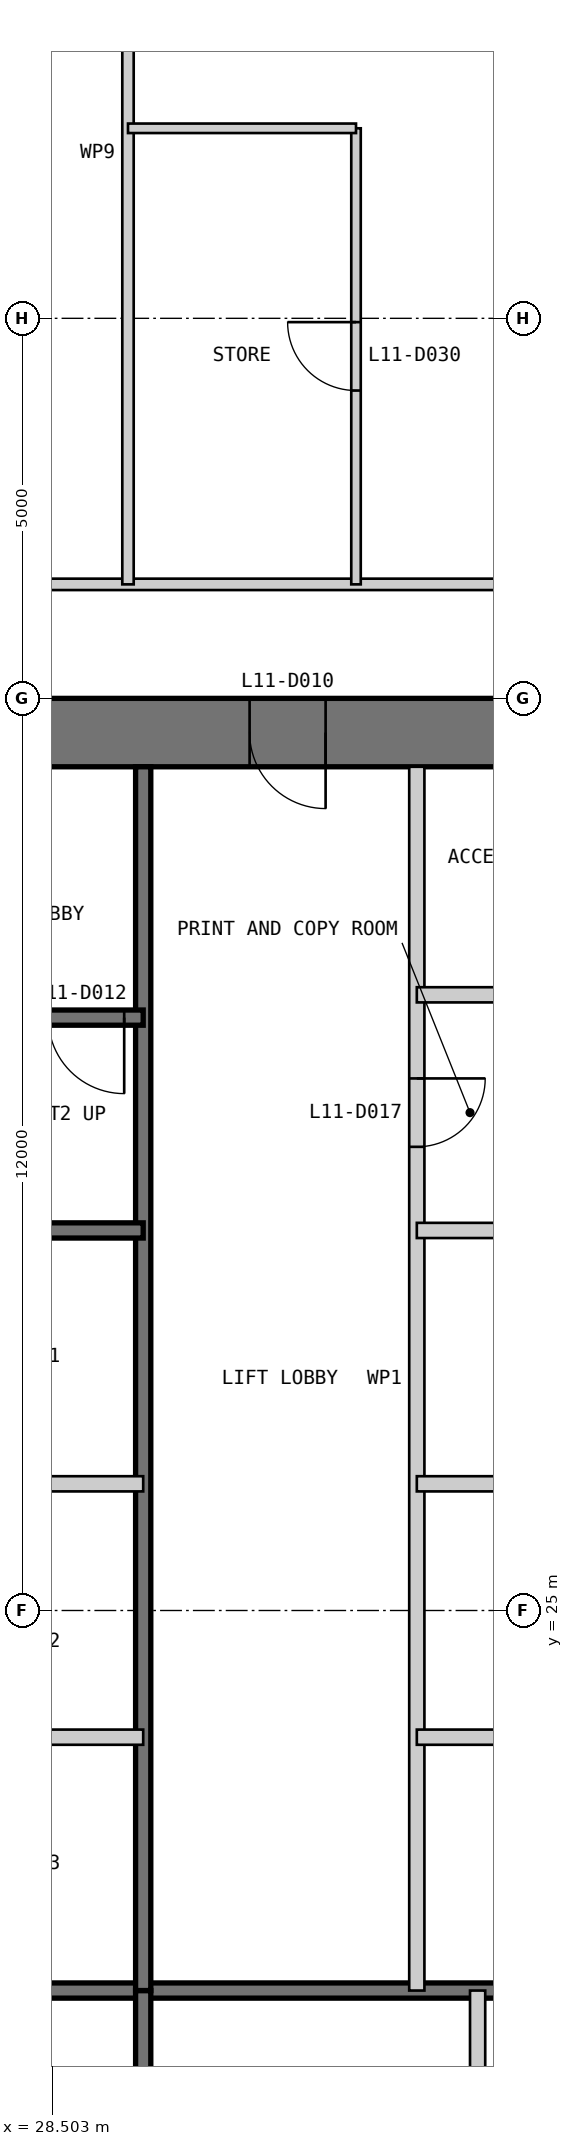
"""IFC4 building model, lengths in metres.
Left out: names, types, materials, properties, quantities, classifications, styles, units other than length and angle.
Written with IfcOpenShell. Run it as: python <this file> out.ifc"""

import sys

from ifc_helpers import new_model, si_unit, direction, frame, frame_2d, origin, place, context, subcontext, project, spatial, polyline, rectangle, outline, extrude, element, fill, save


model = new_model("IFC4")
c1 = context("Model", 3, precision=1e-05, world=origin(), true_north=direction((0.0, 1.0)))
c2 = subcontext(c1, "Body", "Model", "MODEL_VIEW")
j1 = project(units=[si_unit("LENGTHUNIT", "METRE"), si_unit("PLANEANGLEUNIT", "RADIAN")], contexts=[c1])
p1 = place(None, origin())
s1 = spatial("IfcSite", under=j1, at=p1, CompositionType="ELEMENT")
p2 = place(p1, origin())
s2 = spatial("IfcBuilding", under=s1, at=p2, CompositionType="ELEMENT")
p3 = place(p2, frame((0.0, 0.0, 51.0)))
s3 = spatial("IfcBuildingStorey", under=s2, at=p3, CompositionType="ELEMENT", Elevation=51.0)
p4 = place(p3, frame((37.0, 36.55, 0.0), z_axis=(0.0, 0.0, 1.0), x_axis=(-1.0, 0.0, 0.0)))
e1 = element("IfcWall", 1, at=p4, inside=s3, PredefinedType="SHEAR", context=c2, shape_type="SweptSolid", body=[
    extrude(outline(polyline([(0.0, -0.45), (24.0, -0.45), (23.1, 0.45), (0.9, 0.45), (0.0, -0.45)])), origin(), (0.0, 0.0, 1.0), 4.0),
])
p5 = place(p4, frame((4.9, 0.0, 0.0)))
e2 = element("IfcOpeningElement", 2, at=p5, cuts=e1, PredefinedType="OPENING", context=c2, shape_type="SweptSolid", body=[
    extrude(rectangle(XDim=1.0, YDim=2.2, at=frame_2d((0.5, 1.1))), frame((0.0, 0.46, 0.0), z_axis=(0.0, -1.0, 0.0), x_axis=(1.0, 0.0, 0.0)), (0.0, 0.0, 1.0), 0.92),
])
p6 = place(p4, frame((8.9, 0.0, 0.0)))
e3 = element("IfcOpeningElement", 3, at=p6, cuts=e1, PredefinedType="OPENING", context=c2, shape_type="SweptSolid", body=[
    extrude(rectangle(XDim=1.1, YDim=2.2, at=frame_2d((0.55, 1.1))), frame((0.0, 0.46, 0.0), z_axis=(0.0, -1.0, 0.0), x_axis=(1.0, 0.0, 0.0)), (0.0, 0.0, 1.0), 0.92),
])
p7 = place(p4, frame((15.05, 0.0, 0.0)))
e4 = element("IfcOpeningElement", 4, at=p7, cuts=e1, PredefinedType="OPENING", context=c2, shape_type="SweptSolid", body=[
    extrude(rectangle(XDim=0.9, YDim=2.2, at=frame_2d((0.45, 1.1))), frame((0.0, 0.46, 0.0), z_axis=(0.0, -1.0, 0.0), x_axis=(1.0, 0.0, 0.0)), (0.0, 0.0, 1.0), 0.92),
])
p8 = place(p4, frame((17.9, 0.0, 0.0)))
e5 = element("IfcOpeningElement", 5, at=p8, cuts=e1, PredefinedType="OPENING", context=c2, shape_type="SweptSolid", body=[
    extrude(rectangle(XDim=1.0, YDim=2.2, at=frame_2d((0.5, 1.1))), frame((0.0, 0.46, 0.0), z_axis=(0.0, -1.0, 0.0), x_axis=(1.0, 0.0, 0.0)), (0.0, 0.0, 1.0), 0.92),
])
p9 = place(p4, frame((21.4, 0.0, 0.0)))
e6 = element("IfcOpeningElement", 6, at=p9, cuts=e1, PredefinedType="OPENING", context=c2, shape_type="SweptSolid", body=[
    extrude(rectangle(XDim=1.0, YDim=2.2, at=frame_2d((0.5, 1.1))), frame((0.0, 0.46, 0.0), z_axis=(0.0, -1.0, 0.0), x_axis=(1.0, 0.0, 0.0)), (0.0, 0.0, 1.0), 0.92),
])
p10 = place(p3, frame((20.3, 20.0, 0.0), z_axis=(0.0, 0.0, 1.0), x_axis=(1.0, 0.0, 0.0)))
e7 = element("IfcWall", 7, at=p10, inside=s3, PredefinedType="SOLIDWALL", context=c2, shape_type="SweptSolid", body=[
    extrude(rectangle(XDim=15.8, YDim=0.2, at=frame_2d((7.9, 0.0))), origin(), (0.0, 0.0, 1.0), 3.8),
])
p11 = place(p3, frame((29.7, 13.9, 0.0), z_axis=(0.0, 0.0, 1.0), x_axis=(0.0, 1.0, 0.0)))
e8 = element("IfcWall", 8, at=p11, inside=s3, PredefinedType="SOLIDWALL", context=c2, shape_type="SweptSolid", body=[
    extrude(rectangle(XDim=6.1, YDim=0.2, at=frame_2d((3.05, 0.0))), origin(), (0.0, 0.0, 1.0), 3.8),
])
p12 = place(p3, frame((34.1, 13.9, 0.0), z_axis=(0.0, 0.0, 1.0), x_axis=(0.0, 1.0, 0.0)))
e9 = element("IfcWall", 9, at=p12, inside=s3, PredefinedType="PARTITIONING", context=c2, shape_type="SweptSolid", body=[
    extrude(rectangle(XDim=6.1, YDim=0.2, at=frame_2d((3.05, 0.0))), origin(), (0.0, 0.0, 1.0), 3.8),
])
p13 = place(p3, frame((33.3, 36.1, 0.0), z_axis=(0.0, 0.0, 1.0), x_axis=(0.0, -1.0, 0.0)))
e10 = element("IfcWall", 10, at=p13, inside=s3, PredefinedType="PARTITIONING", context=c2, shape_type="SweptSolid", body=[
    extrude(rectangle(XDim=16.1, YDim=0.2, at=frame_2d((8.05, 0.0))), origin(), (0.0, 0.0, 1.0), 3.8),
])
p14 = place(p13, frame((4.1, 0.0, 0.0)))
e11 = element("IfcOpeningElement", 11, at=p14, cuts=e10, PredefinedType="OPENING", context=c2, shape_type="SweptSolid", body=[
    extrude(rectangle(XDim=0.9, YDim=2.2, at=frame_2d((0.45, 1.1))), frame((0.0, 0.11, 0.0), z_axis=(0.0, -1.0, 0.0), x_axis=(1.0, 0.0, 0.0)), (0.0, 0.0, 1.0), 0.22),
])
p15 = place(p3, frame((29.7, 36.1, 0.0), z_axis=(0.0, 0.0, 1.0), x_axis=(0.0, -1.0, 0.0)))
e12 = element("IfcWall", 12, at=p15, inside=s3, PredefinedType="SOLIDWALL", context=c2, shape_type="SweptSolid", body=[
    extrude(rectangle(XDim=16.1, YDim=0.2, at=frame_2d((8.05, 0.0))), origin(), (0.0, 0.0, 1.0), 3.8),
])
for number, where, z_axis, x_axis in (
    (13, (36.1, 30.0, 0.0), (0.0, 0.0, 1.0), (-1.0, 0.0, 0.0)),
    (14, (36.1, 26.667, 0.0), (0.0, 0.0, 1.0), (-1.0, 0.0, 0.0)),
    (15, (36.1, 23.333, 0.0), (0.0, 0.0, 1.0), (-1.0, 0.0, 0.0)),
    (16, (29.7, 26.667, 0.0), (0.0, 0.0, 1.0), (-1.0, 0.0, 0.0)),
    (17, (29.7, 23.333, 0.0), (0.0, 0.0, 1.0), (-1.0, 0.0, 0.0)),
):
    element("IfcWall", number, at=place(p3, frame(where, z_axis=z_axis, x_axis=x_axis)), inside=s3, PredefinedType="PARTITIONING", context=c2, shape_type="SweptSolid", body=[
        extrude(rectangle(XDim=2.8, YDim=0.2, at=frame_2d((1.4, 0.0))), origin(), (0.0, 0.0, 1.0), 3.8),
    ])
p16 = place(p3, frame((29.7, 32.8, 0.0), z_axis=(0.0, 0.0, 1.0), x_axis=(-1.0, 0.0, 0.0)))
e18 = element("IfcWall", 18, at=p16, inside=s3, PredefinedType="SOLIDWALL", context=c2, shape_type="SweptSolid", body=[
    extrude(rectangle(XDim=9.4, YDim=0.2, at=frame_2d((4.7, 0.0))), origin(), (0.0, 0.0, 1.0), 3.8),
])
p17 = place(p16, frame((0.25, 0.0, 0.0)))
e19 = element("IfcOpeningElement", 19, at=p17, cuts=e18, PredefinedType="OPENING", context=c2, shape_type="SweptSolid", body=[
    extrude(rectangle(XDim=1.0, YDim=2.2, at=frame_2d((0.5, 1.1))), frame((0.0, 0.11, 0.0), z_axis=(0.0, -1.0, 0.0), x_axis=(1.0, 0.0, 0.0)), (0.0, 0.0, 1.0), 0.22),
])
p18 = place(p3, frame((29.7, 30.0, 0.0), z_axis=(0.0, 0.0, 1.0), x_axis=(-1.0, 0.0, 0.0)))
e20 = element("IfcWall", 20, at=p18, inside=s3, PredefinedType="SOLIDWALL", context=c2, shape_type="SweptSolid", body=[
    extrude(rectangle(XDim=15.8, YDim=0.2, at=frame_2d((7.9, 0.0))), origin(), (0.0, 0.0, 1.0), 3.8),
])
p19 = place(p3, frame((36.1, 33.1, 0.0), z_axis=(0.0, 0.0, 1.0), x_axis=(-1.0, 0.0, 0.0)))
e21 = element("IfcWall", 21, at=p19, inside=s3, PredefinedType="PARTITIONING", context=c2, shape_type="SweptSolid", body=[
    extrude(rectangle(XDim=2.8, YDim=0.2, at=frame_2d((1.4, 0.0))), origin(), (0.0, 0.0, 1.0), 3.8),
])
p20 = place(p3, frame((38.5, 38.5, 0.0), z_axis=(0.0, 0.0, 1.0), x_axis=(-1.0, 0.0, 0.0)))
e22 = element("IfcWall", 22, at=p20, inside=s3, PredefinedType="PARTITIONING", context=c2, shape_type="SweptSolid", body=[
    extrude(rectangle(XDim=27.0, YDim=0.15, at=frame_2d((13.5, 0.0))), origin(), (0.0, 0.0, 1.0), 3.85),
])
p21 = place(p20, frame((2.5, 0.0, 0.0)))
e23 = element("IfcOpeningElement", 23, at=p21, cuts=e22, PredefinedType="OPENING", context=c2, shape_type="SweptSolid", body=[
    extrude(rectangle(XDim=1.0, YDim=2.2, at=frame_2d((0.5, 1.1))), frame((0.0, 0.085, 0.0), z_axis=(0.0, -1.0, 0.0), x_axis=(1.0, 0.0, 0.0)), (0.0, 0.0, 1.0), 0.17),
])
p22 = place(p20, frame((16.0, 0.0, 0.0)))
e24 = element("IfcOpeningElement", 24, at=p22, cuts=e22, PredefinedType="OPENING", context=c2, shape_type="SweptSolid", body=[
    extrude(rectangle(XDim=1.0, YDim=2.2, at=frame_2d((0.5, 1.1))), frame((0.0, 0.085, 0.0), z_axis=(0.0, -1.0, 0.0), x_axis=(1.0, 0.0, 0.0)), (0.0, 0.0, 1.0), 0.17),
])
p23 = place(p3, frame((32.5, 44.5, 0.0), z_axis=(0.0, 0.0, 1.0), x_axis=(0.0, -1.0, 0.0)))
e25 = element("IfcWall", 25, at=p23, inside=s3, PredefinedType="PARTITIONING", context=c2, shape_type="SweptSolid", body=[
    extrude(rectangle(XDim=6.0, YDim=0.125, at=frame_2d((3.0, 0.0))), origin(), (0.0, 0.0, 1.0), 3.85),
])
p24 = place(p23, frame((2.55, 0.0, 0.0)))
e26 = element("IfcOpeningElement", 26, at=p24, cuts=e25, PredefinedType="OPENING", context=c2, shape_type="SweptSolid", body=[
    extrude(rectangle(XDim=0.9, YDim=2.2, at=frame_2d((0.45, 1.1))), frame((0.0, 0.073, 0.0), z_axis=(0.0, -1.0, 0.0), x_axis=(1.0, 0.0, 0.0)), (0.0, 0.0, 1.0), 0.145),
])
p25 = place(p3, frame((29.5, 49.85, 0.0), z_axis=(0.0, 0.0, 1.0), x_axis=(0.0, -1.0, 0.0)))
e27 = element("IfcWall", 27, at=p25, inside=s3, PredefinedType="PARTITIONING", context=c2, shape_type="SweptSolid", body=[
    extrude(rectangle(XDim=11.35, YDim=0.15, at=frame_2d((5.675, 0.0))), origin(), (0.0, 0.0, 1.0), 3.85),
])
p26 = place(p3, frame((32.5, 44.5, 0.0), z_axis=(0.0, 0.0, 1.0), x_axis=(-1.0, 0.0, 0.0)))
e28 = element("IfcWall", 28, at=p26, inside=s3, PredefinedType="PARTITIONING", context=c2, shape_type="SweptSolid", body=[
    extrude(rectangle(XDim=3.0, YDim=0.125, at=frame_2d((1.5, 0.0))), origin(), (0.0, 0.0, 1.0), 3.85),
])
p27 = place(p5, origin())
e29 = element("IfcDoor", 29, at=p27, inside=s3, OperationType="SINGLE_SWING_LEFT", PredefinedType="DOOR", context=c2, shape_type="SweptSolid", body=[
    extrude(rectangle(XDim=1.0, YDim=2.2, at=frame_2d((0.5, 1.1))), frame((0.0, 0.025, 0.0), z_axis=(0.0, -1.0, 0.0), x_axis=(1.0, 0.0, 0.0)), (0.0, 0.0, 1.0), 0.05),
    extrude(outline(polyline([(0.0, 0.0), (0.04, 0.0), (0.04, 2.16), (0.96, 2.16), (0.96, 0.0), (1.0, 0.0), (1.0, 2.2), (0.0, 2.2), (0.0, 0.0)])), frame((0.0, 0.3, 0.0), z_axis=(0.0, -1.0, 0.0), x_axis=(1.0, 0.0, 0.0)), (0.0, 0.0, 1.0), 0.6),
])
fill(e2, e29)
p28 = place(p17, origin())
e30 = element("IfcDoor", 30, at=p28, inside=s3, OperationType="SINGLE_SWING_LEFT", PredefinedType="DOOR", context=c2, shape_type="SweptSolid", body=[
    extrude(rectangle(XDim=1.0, YDim=2.2, at=frame_2d((0.5, 1.1))), frame((0.0, 0.025, 0.0), z_axis=(0.0, -1.0, 0.0), x_axis=(1.0, 0.0, 0.0)), (0.0, 0.0, 1.0), 0.05),
])
fill(e19, e30)
p29 = place(p14, origin())
e31 = element("IfcDoor", 31, at=p29, inside=s3, OperationType="SINGLE_SWING_LEFT", PredefinedType="DOOR", context=c2, shape_type="SweptSolid", body=[
    extrude(rectangle(XDim=0.9, YDim=2.2, at=frame_2d((0.45, 1.1))), frame((0.0, 0.025, 0.0), z_axis=(0.0, -1.0, 0.0), x_axis=(1.0, 0.0, 0.0)), (0.0, 0.0, 1.0), 0.05),
])
fill(e11, e31)
p30 = place(p24, frame((0.9, 0.0, 0.0), z_axis=(0.0, 0.0, 1.0), x_axis=(-1.0, 0.0, 0.0)))
e32 = element("IfcDoor", 32, at=p30, inside=s3, OperationType="SINGLE_SWING_RIGHT", PredefinedType="DOOR", context=c2, shape_type="SweptSolid", body=[
    extrude(rectangle(XDim=0.9, YDim=2.2, at=frame_2d((0.45, 1.1))), frame((0.0, 0.025, 0.0), z_axis=(0.0, -1.0, 0.0), x_axis=(1.0, 0.0, 0.0)), (0.0, 0.0, 1.0), 0.05),
])
fill(e26, e32)
save(model, sys.argv[1])
